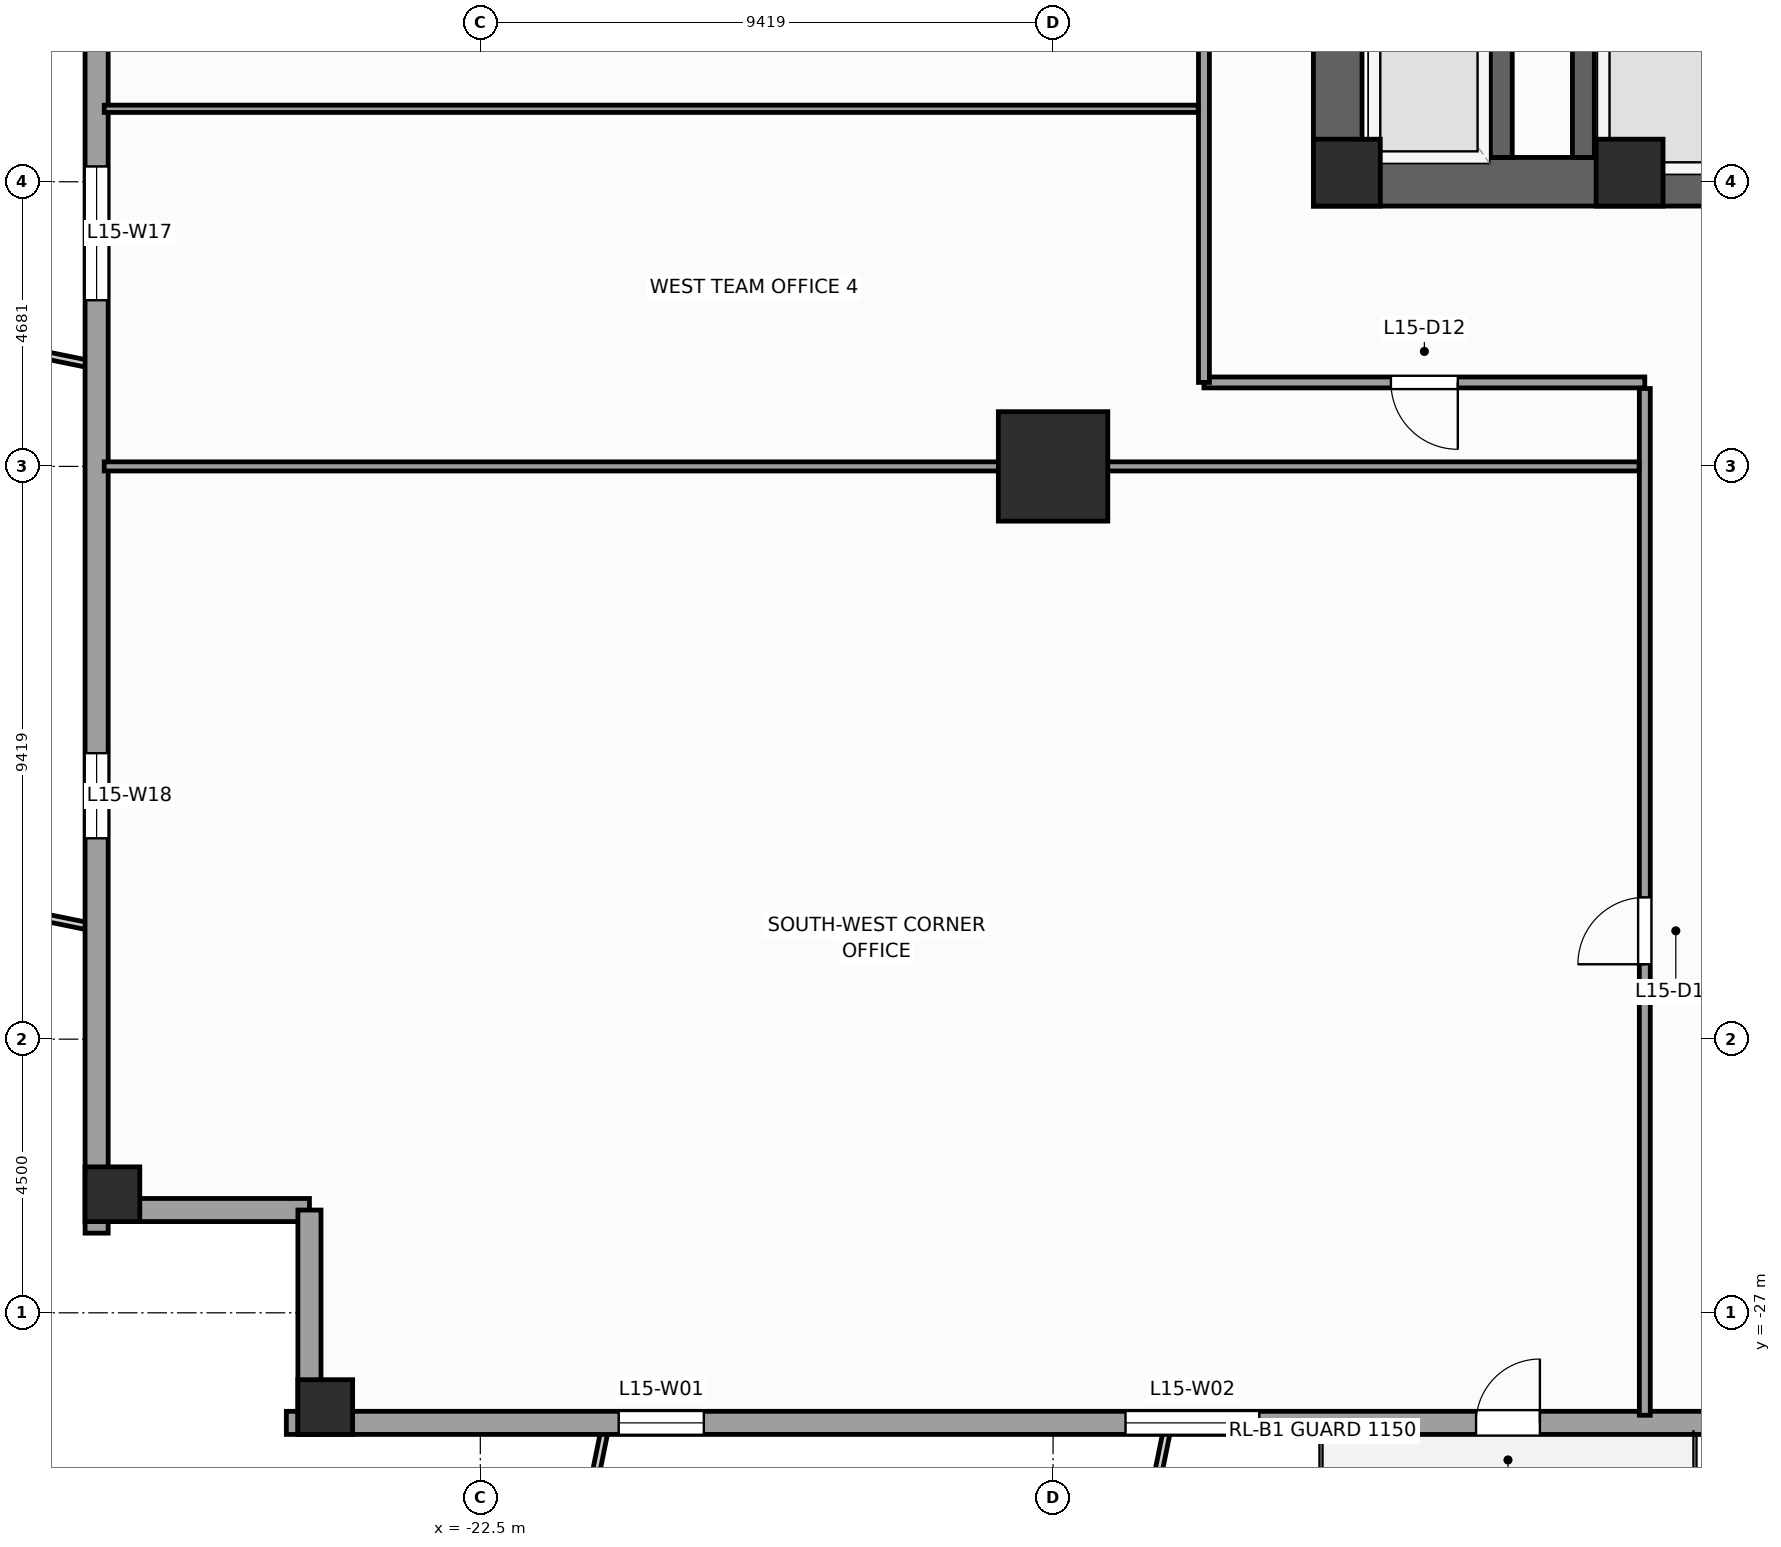
"""IFC4 building model, lengths in metres.
Left out: names, types, materials, properties, quantities, classifications, styles, units other than length and angle.
Written with IfcOpenShell. Run it as: python <this file> out.ifc"""

import sys

from ifc_helpers import new_model, si_unit, direction, frame, frame_2d, origin, origin_2d, place, context, subcontext, project, spatial, rectangle, extrude, source, transform, mapped, element, fill, save


model = new_model("IFC4")
c1 = context("Model", 3, precision=1e-05, world=origin(), true_north=direction((0.0, 1.0)))
c2 = subcontext(c1, "Body", "Model", "MODEL_VIEW")
j1 = project(units=[si_unit("LENGTHUNIT", "METRE"), si_unit("PLANEANGLEUNIT", "RADIAN")], contexts=[c1])
p1 = place(None, origin())
s1 = spatial("IfcSite", under=j1, at=p1, CompositionType="ELEMENT")
p2 = place(p1, origin())
s2 = spatial("IfcBuilding", under=s1, at=p2, CompositionType="ELEMENT")
p3 = place(p2, frame((0.0, 0.0, 66.0)))
s3 = spatial("IfcBuildingStorey", under=s2, at=p3, CompositionType="ELEMENT", Elevation=66.0)
p4 = place(p3, frame((-8.8, -8.4, 0.0), z_axis=(0.0, 0.0, 1.0), x_axis=(1.0, 0.0, 0.0)))
e1 = element("IfcWall", 1, at=p4, inside=s3, PredefinedType="SHEAR", context=c2, shape_type="SweptSolid", body=[
    extrude(rectangle(XDim=17.6, YDim=0.8, at=frame_2d((8.8, 0.0))), origin(), (0.0, 0.0, 1.0), 4.0),
])
p5 = place(p4, frame((8.15, 0.0, 0.0)))
e2 = element("IfcOpeningElement", 2, at=p5, cuts=e1, PredefinedType="OPENING", context=c2, shape_type="SweptSolid", body=[
    extrude(rectangle(XDim=1.3, YDim=2.2, at=frame_2d((0.65, 1.1))), frame((0.0, 0.41, 0.0), z_axis=(0.0, -1.0, 0.0), x_axis=(1.0, 0.0, 0.0)), (0.0, 0.0, 1.0), 0.82),
])
p6 = place(p3, frame((-8.4, -8.0, 0.0), z_axis=(0.0, 0.0, 1.0), x_axis=(0.0, 1.0, 0.0)))
e3 = element("IfcWall", 3, at=p6, inside=s3, PredefinedType="SHEAR", context=c2, shape_type="SweptSolid", body=[
    extrude(rectangle(XDim=16.0, YDim=0.8, at=frame_2d((8.0, 0.0))), origin(), (0.0, 0.0, 1.0), 4.0),
])
p7 = place(p6, frame((4.69, 0.0, 0.0)))
e4 = element("IfcOpeningElement", 4, at=p7, cuts=e3, PredefinedType="OPENING", context=c2, shape_type="SweptSolid", body=[
    extrude(rectangle(XDim=1.3, YDim=2.2, at=frame_2d((0.65, 1.1))), frame((0.0, 0.41, 0.0), z_axis=(0.0, -1.0, 0.0), x_axis=(1.0, 0.0, 0.0)), (0.0, 0.0, 1.0), 0.82),
])
p8 = place(p3, frame((-4.36, -8.0, 0.0), z_axis=(0.0, 0.0, 1.0), x_axis=(0.0, 1.0, 0.0)))
e5 = element("IfcWall", 5, at=p8, inside=s3, PredefinedType="SHEAR", context=c2, shape_type="SweptSolid", body=[
    extrude(rectangle(XDim=16.0, YDim=0.36, at=frame_2d((8.0, 0.0))), origin(), (0.0, 0.0, 1.0), 4.0),
])
p9 = place(p3, frame((-5.71, -8.0, 0.0), z_axis=(0.0, 0.0, 1.0), x_axis=(0.0, 1.0, 0.0)))
e6 = element("IfcWall", 6, at=p9, inside=s3, PredefinedType="SHEAR", context=c2, shape_type="SweptSolid", body=[
    extrude(rectangle(XDim=2.54, YDim=0.36, at=frame_2d((1.27, 0.0))), origin(), (0.0, 0.0, 1.0), 4.0),
])
m1 = source(origin(), c2, "Body", "SweptSolid", [
    extrude(rectangle(XDim=1.1, YDim=1.1, at=origin_2d()), origin(), (0.0, 0.0, 1.0), 4.0),
])
for number, where, z_axis, x_axis in (
    (7, (-8.25, -8.25, 0.0), (0.0, 0.0, 1.0), (1.0, 0.0, 0.0)),
    (8, (-3.6, -8.25, 0.0), (0.0, 0.0, 1.0), (1.0, 0.0, 0.0)),
):
    element("IfcColumn", number, at=place(p3, frame(where, z_axis=z_axis, x_axis=x_axis)), inside=s3, PredefinedType="PILASTER", context=c2, shape_type="MappedRepresentation", body=[
        mapped(m1, transform((0.0, 0.0, 0.0), scale=1.0)),
    ])
m2 = source(origin(), c2, "Body", "SweptSolid", [
    extrude(rectangle(XDim=1.8, YDim=1.8, at=origin_2d()), origin(), (0.0, 0.0, 1.0), 4.0),
])
p10 = place(p3, frame((-13.081, -13.081, 0.0), z_axis=(0.0, 0.0, 1.0), x_axis=(1.0, 0.0, 0.0)))
e9 = element("IfcColumn", 9, at=p10, inside=s3, PredefinedType="COLUMN", context=c2, shape_type="MappedRepresentation", body=[
    mapped(m2, transform((0.0, 0.0, 0.0), scale=1.0)),
])
m3 = source(origin(), c2, "Body", "SweptSolid", [
    extrude(rectangle(XDim=0.9, YDim=0.9, at=origin_2d()), origin(), (0.0, 0.0, 1.0), 4.0),
])
for number, where, z_axis, x_axis in (
    (10, (-25.05, -28.55, 0.0), (0.0, 0.0, 1.0), (1.0, 0.0, 0.0)),
    (11, (-28.55, -25.05, 0.0), (0.0, 0.0, 1.0), (1.0, 0.0, 0.0)),
):
    element("IfcColumn", number, at=place(p3, frame(where, z_axis=z_axis, x_axis=x_axis)), inside=s3, PredefinedType="COLUMN", context=c2, shape_type="MappedRepresentation", body=[
        mapped(m3, transform((0.0, 0.0, 0.0), scale=1.0)),
    ])
p11 = place(p3, frame((-25.69, -28.81, 0.0), z_axis=(0.0, 0.0, 1.0), x_axis=(1.0, 0.0, 0.0)))
e12 = element("IfcWall", 12, at=p11, inside=s3, PredefinedType="STANDARD", context=c2, shape_type="SweptSolid", body=[
    extrude(rectangle(XDim=51.38, YDim=0.38, at=frame_2d((25.69, 0.0))), origin(), (0.0, 0.0, 1.0), 3.12),
])
p12 = place(p11, frame((19.565, 0.0, 0.0)))
e13 = element("IfcOpeningElement", 13, at=p12, cuts=e12, PredefinedType="OPENING", context=c2, shape_type="SweptSolid", body=[
    extrude(rectangle(XDim=1.05, YDim=2.25, at=frame_2d((0.525, 1.125))), frame((0.0, 0.2, 0.0), z_axis=(0.0, -1.0, 0.0), x_axis=(1.0, 0.0, 0.0)), (0.0, 0.0, 1.0), 0.4),
])
p13 = place(p11, frame((5.466, 0.0, 0.49)))
e14 = element("IfcOpeningElement", 14, at=p13, cuts=e12, PredefinedType="OPENING", context=c2, shape_type="SweptSolid", body=[
    extrude(rectangle(XDim=1.4, YDim=2.4, at=frame_2d((0.7, 1.2))), frame((0.0, 0.2, 0.0), z_axis=(0.0, -1.0, 0.0), x_axis=(1.0, 0.0, 0.0)), (0.0, 0.0, 1.0), 0.4),
])
p14 = place(p11, frame((13.8, 0.0, 0.49)))
e15 = element("IfcOpeningElement", 15, at=p14, cuts=e12, PredefinedType="OPENING", context=c2, shape_type="SweptSolid", body=[
    extrude(rectangle(XDim=2.2, YDim=2.4, at=frame_2d((1.1, 1.2))), frame((0.0, 0.2, 0.0), z_axis=(0.0, -1.0, 0.0), x_axis=(1.0, 0.0, 0.0)), (0.0, 0.0, 1.0), 0.4),
])
p15 = place(p11, frame((33.838, 0.0, 0.49)))
e16 = element("IfcOpeningElement", 16, at=p15, cuts=e12, PredefinedType="OPENING", context=c2, shape_type="SweptSolid", body=[
    extrude(rectangle(XDim=2.2, YDim=2.4, at=frame_2d((1.1, 1.2))), frame((0.0, 0.2, 0.0), z_axis=(0.0, -1.0, 0.0), x_axis=(1.0, 0.0, 0.0)), (0.0, 0.0, 1.0), 0.4),
])
p16 = place(p11, frame((43.487, 0.0, 0.49)))
e17 = element("IfcOpeningElement", 17, at=p16, cuts=e12, PredefinedType="OPENING", context=c2, shape_type="SweptSolid", body=[
    extrude(rectangle(XDim=1.4, YDim=2.4, at=frame_2d((0.7, 1.2))), frame((0.0, 0.2, 0.0), z_axis=(0.0, -1.0, 0.0), x_axis=(1.0, 0.0, 0.0)), (0.0, 0.0, 1.0), 0.4),
])
p17 = place(p3, frame((-28.81, 25.69, 0.0), z_axis=(0.0, 0.0, 1.0), x_axis=(0.0, -1.0, 0.0)))
e18 = element("IfcWall", 18, at=p17, inside=s3, PredefinedType="STANDARD", context=c2, shape_type="SweptSolid", body=[
    extrude(rectangle(XDim=51.38, YDim=0.38, at=frame_2d((25.69, 0.0))), origin(), (0.0, 0.0, 1.0), 3.12),
])
p18 = place(p17, frame((5.466, 0.0, 0.49)))
e19 = element("IfcOpeningElement", 19, at=p18, cuts=e18, PredefinedType="OPENING", context=c2, shape_type="SweptSolid", body=[
    extrude(rectangle(XDim=1.4, YDim=2.4, at=frame_2d((0.7, 1.2))), frame((0.0, 0.2, 0.0), z_axis=(0.0, -1.0, 0.0), x_axis=(1.0, 0.0, 0.0)), (0.0, 0.0, 1.0), 0.4),
])
p19 = place(p17, frame((13.8, 0.0, 0.49)))
e20 = element("IfcOpeningElement", 20, at=p19, cuts=e18, PredefinedType="OPENING", context=c2, shape_type="SweptSolid", body=[
    extrude(rectangle(XDim=2.2, YDim=2.4, at=frame_2d((1.1, 1.2))), frame((0.0, 0.2, 0.0), z_axis=(0.0, -1.0, 0.0), x_axis=(1.0, 0.0, 0.0)), (0.0, 0.0, 1.0), 0.4),
])
p20 = place(p17, frame((33.838, 0.0, 0.49)))
e21 = element("IfcOpeningElement", 21, at=p20, cuts=e18, PredefinedType="OPENING", context=c2, shape_type="SweptSolid", body=[
    extrude(rectangle(XDim=2.2, YDim=2.4, at=frame_2d((1.1, 1.2))), frame((0.0, 0.2, 0.0), z_axis=(0.0, -1.0, 0.0), x_axis=(1.0, 0.0, 0.0)), (0.0, 0.0, 1.0), 0.4),
])
p21 = place(p17, frame((43.487, 0.0, 0.49)))
e22 = element("IfcOpeningElement", 22, at=p21, cuts=e18, PredefinedType="OPENING", context=c2, shape_type="SweptSolid", body=[
    extrude(rectangle(XDim=1.4, YDim=2.4, at=frame_2d((0.7, 1.2))), frame((0.0, 0.2, 0.0), z_axis=(0.0, -1.0, 0.0), x_axis=(1.0, 0.0, 0.0)), (0.0, 0.0, 1.0), 0.4),
])
p22 = place(p3, frame((-28.81, -25.31, 0.0), z_axis=(0.0, 0.0, 1.0), x_axis=(1.0, 0.0, 0.0)))
e23 = element("IfcWall", 23, at=p22, inside=s3, PredefinedType="STANDARD", context=c2, shape_type="SweptSolid", body=[
    extrude(rectangle(XDim=3.5, YDim=0.38, at=frame_2d((1.75, 0.0))), origin(), (0.0, 0.0, 1.0), 3.72),
])
p23 = place(p3, frame((-25.31, -25.31, 0.0), z_axis=(0.0, 0.0, 1.0), x_axis=(0.0, -1.0, 0.0)))
e24 = element("IfcWall", 24, at=p23, inside=s3, PredefinedType="STANDARD", context=c2, shape_type="SweptSolid", body=[
    extrude(rectangle(XDim=3.69, YDim=0.38, at=frame_2d((1.845, 0.0))), origin(), (0.0, 0.0, 1.0), 3.72),
])
p24 = place(p3, frame((-10.6, -11.7, 0.0), z_axis=(0.0, 0.0, 1.0), x_axis=(1.0, 0.0, 0.0)))
e25 = element("IfcWall", 25, at=p24, inside=s3, PredefinedType="PARTITIONING", context=c2, shape_type="SweptSolid", body=[
    extrude(rectangle(XDim=7.25, YDim=0.18, at=frame_2d((3.625, 0.0))), origin(), (0.0, 0.0, 1.0), 3.72),
])
p25 = place(p24, frame((3.075, 0.0, 0.0)))
e26 = element("IfcOpeningElement", 26, at=p25, cuts=e25, PredefinedType="OPENING", context=c2, shape_type="SweptSolid", body=[
    extrude(rectangle(XDim=1.1, YDim=2.2, at=frame_2d((0.55, 1.1))), frame((0.0, 0.1, 0.0), z_axis=(0.0, -1.0, 0.0), x_axis=(1.0, 0.0, 0.0)), (0.0, 0.0, 1.0), 0.2),
])
p26 = place(p3, frame((-10.6, -11.7, 0.0), z_axis=(0.0, 0.0, 1.0), x_axis=(0.0, 1.0, 0.0)))
e27 = element("IfcWall", 27, at=p26, inside=s3, PredefinedType="PARTITIONING", context=c2, shape_type="SweptSolid", body=[
    extrude(rectangle(XDim=12.75, YDim=0.18, at=frame_2d((6.375, 0.0))), origin(), (0.0, 0.0, 1.0), 3.72),
])
p27 = place(p3, frame((-3.35, -28.685, 0.0), z_axis=(0.0, 0.0, 1.0), x_axis=(0.0, 1.0, 0.0)))
e28 = element("IfcWall", 28, at=p27, inside=s3, PredefinedType="PARTITIONING", context=c2, shape_type="SweptSolid", body=[
    extrude(rectangle(XDim=16.885, YDim=0.18, at=frame_2d((8.442, 0.0))), origin(), (0.0, 0.0, 1.0), 3.72),
])
p28 = place(p27, frame((7.417, 0.0, 0.0)))
e29 = element("IfcOpeningElement", 29, at=p28, cuts=e28, PredefinedType="OPENING", context=c2, shape_type="SweptSolid", body=[
    extrude(rectangle(XDim=1.1, YDim=2.2, at=frame_2d((0.55, 1.1))), frame((0.0, 0.1, 0.0), z_axis=(0.0, -1.0, 0.0), x_axis=(1.0, 0.0, 0.0)), (0.0, 0.0, 1.0), 0.2),
])
p29 = place(p3, frame((-28.685, -13.081, 0.0), z_axis=(0.0, 0.0, 1.0), x_axis=(1.0, 0.0, 0.0)))
e30 = element("IfcWall", 30, at=p29, inside=s3, PredefinedType="PARTITIONING", context=c2, shape_type="SweptSolid", body=[
    extrude(rectangle(XDim=25.24, YDim=0.15, at=frame_2d((12.62, 0.0))), origin(), (0.0, 0.0, 1.0), 2.712),
])
p30 = place(p3, frame((-28.685, -7.2, 0.0), z_axis=(0.0, 0.0, 1.0), x_axis=(1.0, 0.0, 0.0)))
e31 = element("IfcWall", 31, at=p30, inside=s3, PredefinedType="PARTITIONING", context=c2, shape_type="SweptSolid", body=[
    extrude(rectangle(XDim=17.99, YDim=0.12, at=frame_2d((8.995, 0.0))), origin(), (0.0, 0.0, 1.0), 3.72),
])
m4 = source(origin(), c2, "Body", "SweptSolid", [
    extrude(rectangle(XDim=1.05, YDim=2.25, at=frame_2d((0.525, 1.125))), frame((0.0, 0.025, 0.0), z_axis=(0.0, -1.0, 0.0), x_axis=(1.0, 0.0, 0.0)), (0.0, 0.0, 1.0), 0.05),
])
p31 = place(p12, origin())
e32 = element("IfcDoor", 32, at=p31, inside=s3, OperationType="SINGLE_SWING_RIGHT", PredefinedType="DOOR", context=c2, shape_type="MappedRepresentation", body=[
    mapped(m4, transform((0.0, 0.0, 0.0), scale=1.0)),
])
fill(e13, e32)
m5 = source(origin(), c2, "Body", "SweptSolid", [
    extrude(rectangle(XDim=1.4, YDim=2.4, at=frame_2d((0.7, 1.2))), frame((0.0, 0.03, 0.0), z_axis=(0.0, -1.0, 0.0), x_axis=(1.0, 0.0, 0.0)), (0.0, 0.0, 1.0), 0.06),
])
p32 = place(p13, origin())
e33 = element("IfcWindow", 33, at=p32, inside=s3, PartitioningType="SINGLE_PANEL", PredefinedType="WINDOW", context=c2, shape_type="MappedRepresentation", body=[
    mapped(m5, transform((0.0, 0.0, 0.0), scale=1.0)),
])
fill(e14, e33)
m6 = source(origin(), c2, "Body", "SweptSolid", [
    extrude(rectangle(XDim=2.2, YDim=2.4, at=frame_2d((1.1, 1.2))), frame((0.0, 0.03, 0.0), z_axis=(0.0, -1.0, 0.0), x_axis=(1.0, 0.0, 0.0)), (0.0, 0.0, 1.0), 0.06),
])
p33 = place(p14, origin())
e34 = element("IfcWindow", 34, at=p33, inside=s3, PartitioningType="SINGLE_PANEL", PredefinedType="WINDOW", context=c2, shape_type="MappedRepresentation", body=[
    mapped(m6, transform((0.0, 0.0, 0.0), scale=1.0)),
])
fill(e15, e34)
p34 = place(p20, origin())
e35 = element("IfcWindow", 35, at=p34, inside=s3, PartitioningType="SINGLE_PANEL", PredefinedType="WINDOW", context=c2, shape_type="MappedRepresentation", body=[
    mapped(m6, transform((0.0, 0.0, 0.0), scale=1.0)),
])
fill(e21, e35)
p35 = place(p21, origin())
e36 = element("IfcWindow", 36, at=p35, inside=s3, PartitioningType="SINGLE_PANEL", PredefinedType="WINDOW", context=c2, shape_type="MappedRepresentation", body=[
    mapped(m5, transform((0.0, 0.0, 0.0), scale=1.0)),
])
fill(e22, e36)
m7 = source(origin(), c2, "Body", "SweptSolid", [
    extrude(rectangle(XDim=1.1, YDim=2.2, at=frame_2d((0.55, 1.1))), frame((0.0, 0.025, 0.0), z_axis=(0.0, -1.0, 0.0), x_axis=(1.0, 0.0, 0.0)), (0.0, 0.0, 1.0), 0.05),
])
p36 = place(p25, frame((1.1, 0.0, 0.0), z_axis=(0.0, 0.0, 1.0), x_axis=(-1.0, 0.0, 0.0)))
e37 = element("IfcDoor", 37, at=p36, inside=s3, OperationType="SINGLE_SWING_RIGHT", PredefinedType="DOOR", context=c2, shape_type="MappedRepresentation", body=[
    mapped(m7, transform((0.0, 0.0, 0.0), scale=1.0)),
])
fill(e26, e37)
p37 = place(p28, origin())
e38 = element("IfcDoor", 38, at=p37, inside=s3, OperationType="SINGLE_SWING_LEFT", PredefinedType="DOOR", context=c2, shape_type="MappedRepresentation", body=[
    mapped(m7, transform((0.0, 0.0, 0.0), scale=1.0)),
])
fill(e29, e38)
save(model, sys.argv[1])
